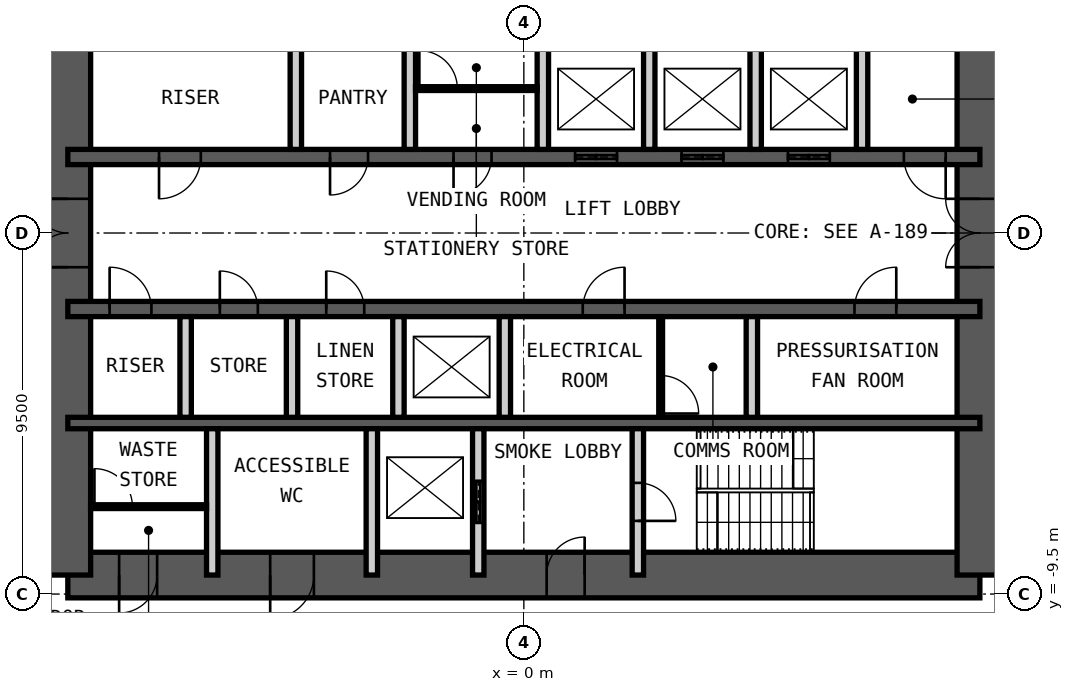
"""IFC4 building model, lengths in metres.
Left out: names, types, materials, properties, quantities, classifications, styles, units other than length and angle.
Written with IfcOpenShell. Run it as: python <this file> out.ifc"""

import sys

from ifc_helpers import new_model, si_unit, direction, frame, frame_2d, origin, place, context, subcontext, project, spatial, rectangle, extrude, element, fill, save


model = new_model("IFC4")
c1 = context("Model", 3, precision=1e-05, world=origin(), true_north=direction((0.0, 1.0)))
c2 = subcontext(c1, "Body", "Model", "MODEL_VIEW")
j1 = project(units=[si_unit("LENGTHUNIT", "METRE"), si_unit("PLANEANGLEUNIT", "RADIAN")], contexts=[c1])
p1 = place(None, origin())
s1 = spatial("IfcSite", under=j1, at=p1, CompositionType="ELEMENT")
p2 = place(p1, origin())
s2 = spatial("IfcBuilding", under=s1, at=p2, CompositionType="ELEMENT")
p3 = place(p2, frame((0.0, 0.0, 193.0)))
s3 = spatial("IfcBuildingStorey", under=s2, at=p3, CompositionType="ELEMENT", Elevation=193.0)
p4 = place(p3, frame((-12.0, -9.0, 0.0), z_axis=(0.0, 0.0, 1.0), x_axis=(1.0, 0.0, 0.0)))
e1 = element("IfcWall", 1, at=p4, inside=s3, PredefinedType="SHEAR", context=c2, shape_type="SweptSolid", body=[
    extrude(rectangle(XDim=24.0, YDim=1.2, at=frame_2d((12.0, 0.0))), origin(), (0.0, 0.0, 1.0), 4.2),
])
p5 = place(p4, frame((1.35, 0.0, 0.0)))
e2 = element("IfcOpeningElement", 2, at=p5, cuts=e1, PredefinedType="OPENING", context=c2, shape_type="SweptSolid", body=[
    extrude(rectangle(XDim=1.0, YDim=2.1, at=frame_2d((0.5, 1.05))), frame((0.0, 0.61, 0.0), z_axis=(0.0, -1.0, 0.0), x_axis=(1.0, 0.0, 0.0)), (0.0, 0.0, 1.0), 1.22),
])
p6 = place(p4, frame((5.325, 0.0, 0.0)))
e3 = element("IfcOpeningElement", 3, at=p6, cuts=e1, PredefinedType="OPENING", context=c2, shape_type="SweptSolid", body=[
    extrude(rectangle(XDim=1.15, YDim=2.1, at=frame_2d((0.575, 1.05))), frame((0.0, 0.61, 0.0), z_axis=(0.0, -1.0, 0.0), x_axis=(1.0, 0.0, 0.0)), (0.0, 0.0, 1.0), 1.22),
])
p7 = place(p4, frame((12.6, 0.0, 0.0)))
e4 = element("IfcOpeningElement", 4, at=p7, cuts=e1, PredefinedType="OPENING", context=c2, shape_type="SweptSolid", body=[
    extrude(rectangle(XDim=1.0, YDim=2.1, at=frame_2d((0.5, 1.05))), frame((0.0, 0.61, 0.0), z_axis=(0.0, -1.0, 0.0), x_axis=(1.0, 0.0, 0.0)), (0.0, 0.0, 1.0), 1.22),
])
p8 = place(p3, frame((12.0, -9.0, 0.0), z_axis=(0.0, 0.0, 1.0), x_axis=(0.0, 1.0, 0.0)))
e5 = element("IfcWall", 5, at=p8, inside=s3, PredefinedType="SHEAR", context=c2, shape_type="SweptSolid", body=[
    extrude(rectangle(XDim=18.0, YDim=1.2, at=frame_2d((9.0, 0.0))), origin(), (0.0, 0.0, 1.0), 4.2),
])
p9 = place(p8, frame((8.1, 0.0, 0.0)))
e6 = element("IfcOpeningElement", 6, at=p9, cuts=e5, PredefinedType="OPENING", context=c2, shape_type="SweptSolid", body=[
    extrude(rectangle(XDim=1.8, YDim=2.1, at=frame_2d((0.9, 1.05))), frame((0.0, 0.61, 0.0), z_axis=(0.0, -1.0, 0.0), x_axis=(1.0, 0.0, 0.0)), (0.0, 0.0, 1.0), 1.22),
])
p10 = place(p3, frame((-12.0, -9.0, 0.0), z_axis=(0.0, 0.0, 1.0), x_axis=(0.0, 1.0, 0.0)))
e7 = element("IfcWall", 7, at=p10, inside=s3, PredefinedType="SHEAR", context=c2, shape_type="SweptSolid", body=[
    extrude(rectangle(XDim=18.0, YDim=1.2, at=frame_2d((9.0, 0.0))), origin(), (0.0, 0.0, 1.0), 4.2),
])
p11 = place(p10, frame((8.1, 0.0, 0.0)))
e8 = element("IfcOpeningElement", 8, at=p11, cuts=e7, PredefinedType="OPENING", context=c2, shape_type="SweptSolid", body=[
    extrude(rectangle(XDim=1.8, YDim=2.1, at=frame_2d((0.9, 1.05))), frame((0.0, 0.61, 0.0), z_axis=(0.0, -1.0, 0.0), x_axis=(1.0, 0.0, 0.0)), (0.0, 0.0, 1.0), 1.22),
])
p12 = place(p3, frame((-12.0, 2.0, 0.0), z_axis=(0.0, 0.0, 1.0), x_axis=(1.0, 0.0, 0.0)))
e9 = element("IfcWall", 9, at=p12, inside=s3, PredefinedType="SHEAR", context=c2, shape_type="SweptSolid", body=[
    extrude(rectangle(XDim=24.0, YDim=0.4, at=frame_2d((12.0, 0.0))), origin(), (0.0, 0.0, 1.0), 4.2),
])
p13 = place(p12, frame((2.4, 0.0, 0.0)))
e10 = element("IfcOpeningElement", 10, at=p13, cuts=e9, PredefinedType="OPENING", context=c2, shape_type="SweptSolid", body=[
    extrude(rectangle(XDim=1.1, YDim=2.1, at=frame_2d((0.55, 1.05))), frame((0.0, 0.21, 0.0), z_axis=(0.0, -1.0, 0.0), x_axis=(1.0, 0.0, 0.0)), (0.0, 0.0, 1.0), 0.42),
])
p14 = place(p12, frame((22.0, 0.0, 0.0)))
e11 = element("IfcOpeningElement", 11, at=p14, cuts=e9, PredefinedType="OPENING", context=c2, shape_type="SweptSolid", body=[
    extrude(rectangle(XDim=1.1, YDim=2.1, at=frame_2d((0.55, 1.05))), frame((0.0, 0.21, 0.0), z_axis=(0.0, -1.0, 0.0), x_axis=(1.0, 0.0, 0.0)), (0.0, 0.0, 1.0), 0.42),
])
p15 = place(p12, frame((10.15, 0.0, 0.0)))
e12 = element("IfcOpeningElement", 12, at=p15, cuts=e9, PredefinedType="OPENING", context=c2, shape_type="SweptSolid", body=[
    extrude(rectangle(XDim=1.0, YDim=2.1, at=frame_2d((0.5, 1.05))), frame((0.0, 0.21, 0.0), z_axis=(0.0, -1.0, 0.0), x_axis=(1.0, 0.0, 0.0)), (0.0, 0.0, 1.0), 0.42),
])
p16 = place(p12, frame((6.9, 0.0, 0.0)))
e13 = element("IfcOpeningElement", 13, at=p16, cuts=e9, PredefinedType="OPENING", context=c2, shape_type="SweptSolid", body=[
    extrude(rectangle(XDim=1.0, YDim=2.1, at=frame_2d((0.5, 1.05))), frame((0.0, 0.21, 0.0), z_axis=(0.0, -1.0, 0.0), x_axis=(1.0, 0.0, 0.0)), (0.0, 0.0, 1.0), 0.42),
])
p17 = place(p12, frame((13.35, 0.0, 0.0)))
e14 = element("IfcOpeningElement", 14, at=p17, cuts=e9, PredefinedType="OPENING", context=c2, shape_type="SweptSolid", body=[
    extrude(rectangle(XDim=1.1, YDim=2.4, at=frame_2d((0.55, 1.2))), frame((0.0, 0.21, 0.0), z_axis=(0.0, -1.0, 0.0), x_axis=(1.0, 0.0, 0.0)), (0.0, 0.0, 1.0), 0.42),
])
p18 = place(p12, frame((16.15, 0.0, 0.0)))
e15 = element("IfcOpeningElement", 15, at=p18, cuts=e9, PredefinedType="OPENING", context=c2, shape_type="SweptSolid", body=[
    extrude(rectangle(XDim=1.1, YDim=2.4, at=frame_2d((0.55, 1.2))), frame((0.0, 0.21, 0.0), z_axis=(0.0, -1.0, 0.0), x_axis=(1.0, 0.0, 0.0)), (0.0, 0.0, 1.0), 0.42),
])
p19 = place(p12, frame((18.95, 0.0, 0.0)))
e16 = element("IfcOpeningElement", 16, at=p19, cuts=e9, PredefinedType="OPENING", context=c2, shape_type="SweptSolid", body=[
    extrude(rectangle(XDim=1.1, YDim=2.4, at=frame_2d((0.55, 1.2))), frame((0.0, 0.21, 0.0), z_axis=(0.0, -1.0, 0.0), x_axis=(1.0, 0.0, 0.0)), (0.0, 0.0, 1.0), 0.42),
])
p20 = place(p3, frame((-12.0, -2.0, 0.0), z_axis=(0.0, 0.0, 1.0), x_axis=(1.0, 0.0, 0.0)))
e17 = element("IfcWall", 17, at=p20, inside=s3, PredefinedType="SHEAR", context=c2, shape_type="SweptSolid", body=[
    extrude(rectangle(XDim=24.0, YDim=0.4, at=frame_2d((12.0, 0.0))), origin(), (0.0, 0.0, 1.0), 4.2),
])
p21 = place(p20, frame((1.1, 0.0, 0.0)))
e18 = element("IfcOpeningElement", 18, at=p21, cuts=e17, PredefinedType="OPENING", context=c2, shape_type="SweptSolid", body=[
    extrude(rectangle(XDim=1.1, YDim=2.1, at=frame_2d((0.55, 1.05))), frame((0.0, 0.21, 0.0), z_axis=(0.0, -1.0, 0.0), x_axis=(1.0, 0.0, 0.0)), (0.0, 0.0, 1.0), 0.42),
])
p22 = place(p20, frame((13.55, 0.0, 0.0)))
e19 = element("IfcOpeningElement", 19, at=p22, cuts=e17, PredefinedType="OPENING", context=c2, shape_type="SweptSolid", body=[
    extrude(rectangle(XDim=1.1, YDim=2.1, at=frame_2d((0.55, 1.05))), frame((0.0, 0.21, 0.0), z_axis=(0.0, -1.0, 0.0), x_axis=(1.0, 0.0, 0.0)), (0.0, 0.0, 1.0), 0.42),
])
p23 = place(p20, frame((20.7, 0.0, 0.0)))
e20 = element("IfcOpeningElement", 20, at=p23, cuts=e17, PredefinedType="OPENING", context=c2, shape_type="SweptSolid", body=[
    extrude(rectangle(XDim=1.1, YDim=2.1, at=frame_2d((0.55, 1.05))), frame((0.0, 0.21, 0.0), z_axis=(0.0, -1.0, 0.0), x_axis=(1.0, 0.0, 0.0)), (0.0, 0.0, 1.0), 0.42),
])
p24 = place(p20, frame((4.0, 0.0, 0.0)))
e21 = element("IfcOpeningElement", 21, at=p24, cuts=e17, PredefinedType="OPENING", context=c2, shape_type="SweptSolid", body=[
    extrude(rectangle(XDim=1.0, YDim=2.1, at=frame_2d((0.5, 1.05))), frame((0.0, 0.21, 0.0), z_axis=(0.0, -1.0, 0.0), x_axis=(1.0, 0.0, 0.0)), (0.0, 0.0, 1.0), 0.42),
])
p25 = place(p20, frame((6.8, 0.0, 0.0)))
e22 = element("IfcOpeningElement", 22, at=p25, cuts=e17, PredefinedType="OPENING", context=c2, shape_type="SweptSolid", body=[
    extrude(rectangle(XDim=1.0, YDim=2.1, at=frame_2d((0.5, 1.05))), frame((0.0, 0.21, 0.0), z_axis=(0.0, -1.0, 0.0), x_axis=(1.0, 0.0, 0.0)), (0.0, 0.0, 1.0), 0.42),
])
p26 = place(p3, frame((-12.0, -5.0, 0.0), z_axis=(0.0, 0.0, 1.0), x_axis=(1.0, 0.0, 0.0)))
e23 = element("IfcWall", 23, at=p26, inside=s3, PredefinedType="SHEAR", context=c2, shape_type="SweptSolid", body=[
    extrude(rectangle(XDim=24.0, YDim=0.3, at=frame_2d((12.0, 0.0))), origin(), (0.0, 0.0, 1.0), 4.2),
])
for number, where, z_axis, x_axis in (
    (24, (-6.0, 2.2, 0.0), (0.0, 0.0, 1.0), (0.0, 1.0, 0.0)),
    (25, (-3.0, 2.2, 0.0), (0.0, 0.0, 1.0), (0.0, 1.0, 0.0)),
    (26, (0.5, 2.2, 0.0), (0.0, 0.0, 1.0), (0.0, 1.0, 0.0)),
    (27, (3.3, 2.2, 0.0), (0.0, 0.0, 1.0), (0.0, 1.0, 0.0)),
    (28, (6.1, 2.2, 0.0), (0.0, 0.0, 1.0), (0.0, 1.0, 0.0)),
    (29, (8.9, 2.2, 0.0), (0.0, 0.0, 1.0), (0.0, 1.0, 0.0)),
    (30, (-8.9, -4.85, 0.0), (0.0, 0.0, 1.0), (0.0, 1.0, 0.0)),
    (31, (-6.1, -4.85, 0.0), (0.0, 0.0, 1.0), (0.0, 1.0, 0.0)),
    (32, (-3.3, -4.85, 0.0), (0.0, 0.0, 1.0), (0.0, 1.0, 0.0)),
    (33, (-0.5, -4.85, 0.0), (0.0, 0.0, 1.0), (0.0, 1.0, 0.0)),
    (34, (6.0, -4.85, 0.0), (0.0, 0.0, 1.0), (0.0, 1.0, 0.0)),
):
    element("IfcWall", number, at=place(p3, frame(where, z_axis=z_axis, x_axis=x_axis)), inside=s3, PredefinedType="PARTITIONING", context=c2, shape_type="SweptSolid", body=[
        extrude(rectangle(XDim=2.65, YDim=0.3, at=frame_2d((1.325, 0.0))), origin(), (0.0, 0.0, 1.0), 3.98),
    ])
for number, where, z_axis, x_axis in (
    (35, (-8.2, -9.0, 0.0), (0.0, 0.0, 1.0), (0.0, 1.0, 0.0)),
    (36, (-4.0, -9.0, 0.0), (0.0, 0.0, 1.0), (0.0, 1.0, 0.0)),
):
    element("IfcWall", number, at=place(p3, frame(where, z_axis=z_axis, x_axis=x_axis)), inside=s3, PredefinedType="PARTITIONING", context=c2, shape_type="SweptSolid", body=[
        extrude(rectangle(XDim=3.85, YDim=0.3, at=frame_2d((1.925, 0.0))), origin(), (0.0, 0.0, 1.0), 3.98),
    ])
p27 = place(p3, frame((-1.2, -9.0, 0.0), z_axis=(0.0, 0.0, 1.0), x_axis=(0.0, 1.0, 0.0)))
e37 = element("IfcWall", 37, at=p27, inside=s3, PredefinedType="PARTITIONING", context=c2, shape_type="SweptSolid", body=[
    extrude(rectangle(XDim=3.85, YDim=0.3, at=frame_2d((1.925, 0.0))), origin(), (0.0, 0.0, 1.0), 3.98),
])
p28 = place(p27, frame((1.375, 0.0, 0.0)))
e38 = element("IfcOpeningElement", 38, at=p28, cuts=e37, PredefinedType="OPENING", context=c2, shape_type="SweptSolid", body=[
    extrude(rectangle(XDim=1.1, YDim=2.4, at=frame_2d((0.55, 1.2))), frame((0.0, 0.16, 0.0), z_axis=(0.0, -1.0, 0.0), x_axis=(1.0, 0.0, 0.0)), (0.0, 0.0, 1.0), 0.32),
])
p29 = place(p3, frame((3.0, -9.0, 0.0), z_axis=(0.0, 0.0, 1.0), x_axis=(0.0, 1.0, 0.0)))
e39 = element("IfcWall", 39, at=p29, inside=s3, PredefinedType="PARTITIONING", context=c2, shape_type="SweptSolid", body=[
    extrude(rectangle(XDim=3.85, YDim=0.3, at=frame_2d((1.925, 0.0))), origin(), (0.0, 0.0, 1.0), 3.98),
])
p30 = place(p29, frame((1.425, 0.0, 0.0)))
e40 = element("IfcOpeningElement", 40, at=p30, cuts=e39, PredefinedType="OPENING", context=c2, shape_type="SweptSolid", body=[
    extrude(rectangle(XDim=1.0, YDim=2.1, at=frame_2d((0.5, 1.05))), frame((0.0, 0.16, 0.0), z_axis=(0.0, -1.0, 0.0), x_axis=(1.0, 0.0, 0.0)), (0.0, 0.0, 1.0), 0.32),
])
p31 = place(p3, frame((-2.85, 3.8, 0.0), z_axis=(0.0, 0.0, 1.0), x_axis=(1.0, 0.0, 0.0)))
e41 = element("IfcWall", 41, at=p31, inside=s3, PredefinedType="PARTITIONING", context=c2, shape_type="SweptSolid", body=[
    extrude(rectangle(XDim=3.2, YDim=0.1, at=frame_2d((1.6, 0.0))), origin(), (0.0, 0.0, 1.0), 3.98),
])
p32 = place(p31, frame((0.1, 0.0, 0.0)))
e42 = element("IfcOpeningElement", 42, at=p32, cuts=e41, PredefinedType="OPENING", context=c2, shape_type="SweptSolid", body=[
    extrude(rectangle(XDim=1.0, YDim=2.4, at=frame_2d((0.5, 1.2))), frame((0.0, 0.06, 0.0), z_axis=(0.0, -1.0, 0.0), x_axis=(1.0, 0.0, 0.0)), (0.0, 0.0, 1.0), 0.12),
])
p33 = place(p3, frame((3.6, -4.85, 0.0), z_axis=(0.0, 0.0, 1.0), x_axis=(0.0, 1.0, 0.0)))
e43 = element("IfcWall", 43, at=p33, inside=s3, PredefinedType="PARTITIONING", context=c2, shape_type="SweptSolid", body=[
    extrude(rectangle(XDim=2.65, YDim=0.1, at=frame_2d((1.325, 0.0))), origin(), (0.0, 0.0, 1.0), 3.98),
])
p34 = place(p33, frame((0.1, 0.0, 0.0)))
e44 = element("IfcOpeningElement", 44, at=p34, cuts=e43, PredefinedType="OPENING", context=c2, shape_type="SweptSolid", body=[
    extrude(rectangle(XDim=1.0, YDim=2.4, at=frame_2d((0.5, 1.2))), frame((0.0, 0.06, 0.0), z_axis=(0.0, -1.0, 0.0), x_axis=(1.0, 0.0, 0.0)), (0.0, 0.0, 1.0), 0.12),
])
p35 = place(p3, frame((-11.4, -7.2, 0.0), z_axis=(0.0, 0.0, 1.0), x_axis=(1.0, 0.0, 0.0)))
e45 = element("IfcWall", 45, at=p35, inside=s3, PredefinedType="PARTITIONING", context=c2, shape_type="SweptSolid", body=[
    extrude(rectangle(XDim=3.05, YDim=0.1, at=frame_2d((1.525, 0.0))), origin(), (0.0, 0.0, 1.0), 3.98),
])
p36 = place(p35, frame((0.1, 0.0, 0.0)))
e46 = element("IfcOpeningElement", 46, at=p36, cuts=e45, PredefinedType="OPENING", context=c2, shape_type="SweptSolid", body=[
    extrude(rectangle(XDim=1.0, YDim=2.4, at=frame_2d((0.5, 1.2))), frame((0.0, 0.06, 0.0), z_axis=(0.0, -1.0, 0.0), x_axis=(1.0, 0.0, 0.0)), (0.0, 0.0, 1.0), 0.12),
])
p37 = place(p5, origin())
e47 = element("IfcDoor", 47, at=p37, inside=s3, OperationType="SINGLE_SWING_LEFT", PredefinedType="DOOR", context=c2, shape_type="SweptSolid", body=[
    extrude(rectangle(XDim=1.0, YDim=2.1, at=frame_2d((0.5, 1.05))), frame((0.0, 0.025, 0.0), z_axis=(0.0, -1.0, 0.0), x_axis=(1.0, 0.0, 0.0)), (0.0, 0.0, 1.0), 0.05),
])
fill(e2, e47)
p38 = place(p6, origin())
e48 = element("IfcDoor", 48, at=p38, inside=s3, OperationType="SINGLE_SWING_LEFT", PredefinedType="DOOR", context=c2, shape_type="SweptSolid", body=[
    extrude(rectangle(XDim=1.15, YDim=2.1, at=frame_2d((0.575, 1.05))), frame((0.0, 0.025, 0.0), z_axis=(0.0, -1.0, 0.0), x_axis=(1.0, 0.0, 0.0)), (0.0, 0.0, 1.0), 0.05),
])
fill(e3, e48)
p39 = place(p7, origin())
e49 = element("IfcDoor", 49, at=p39, inside=s3, OperationType="SINGLE_SWING_LEFT", PredefinedType="DOOR", context=c2, shape_type="SweptSolid", body=[
    extrude(rectangle(XDim=1.0, YDim=2.1, at=frame_2d((0.5, 1.05))), frame((0.0, 0.025, 0.0), z_axis=(0.0, -1.0, 0.0), x_axis=(1.0, 0.0, 0.0)), (0.0, 0.0, 1.0), 0.05),
])
fill(e4, e49)
p40 = place(p30, origin())
e50 = element("IfcDoor", 50, at=p40, inside=s3, OperationType="SINGLE_SWING_LEFT", PredefinedType="DOOR", context=c2, shape_type="SweptSolid", body=[
    extrude(rectangle(XDim=1.0, YDim=2.1, at=frame_2d((0.5, 1.05))), frame((0.0, 0.025, 0.0), z_axis=(0.0, -1.0, 0.0), x_axis=(1.0, 0.0, 0.0)), (0.0, 0.0, 1.0), 0.05),
])
fill(e40, e50)
p41 = place(p13, origin())
e51 = element("IfcDoor", 51, at=p41, inside=s3, OperationType="SINGLE_SWING_LEFT", PredefinedType="DOOR", context=c2, shape_type="SweptSolid", body=[
    extrude(rectangle(XDim=1.1, YDim=2.1, at=frame_2d((0.55, 1.05))), frame((0.0, 0.025, 0.0), z_axis=(0.0, -1.0, 0.0), x_axis=(1.0, 0.0, 0.0)), (0.0, 0.0, 1.0), 0.05),
])
fill(e10, e51)
p42 = place(p21, origin())
e52 = element("IfcDoor", 52, at=p42, inside=s3, OperationType="SINGLE_SWING_RIGHT", PredefinedType="DOOR", context=c2, shape_type="SweptSolid", body=[
    extrude(rectangle(XDim=1.1, YDim=2.1, at=frame_2d((0.55, 1.05))), frame((0.0, 0.025, 0.0), z_axis=(0.0, -1.0, 0.0), x_axis=(1.0, 0.0, 0.0)), (0.0, 0.0, 1.0), 0.05),
])
fill(e18, e52)
p43 = place(p14, origin())
e53 = element("IfcDoor", 53, at=p43, inside=s3, OperationType="SINGLE_SWING_RIGHT", PredefinedType="DOOR", context=c2, shape_type="SweptSolid", body=[
    extrude(rectangle(XDim=1.1, YDim=2.1, at=frame_2d((0.55, 1.05))), frame((0.0, 0.025, 0.0), z_axis=(0.0, -1.0, 0.0), x_axis=(1.0, 0.0, 0.0)), (0.0, 0.0, 1.0), 0.05),
])
fill(e11, e53)
p44 = place(p15, origin())
e54 = element("IfcDoor", 54, at=p44, inside=s3, OperationType="SINGLE_SWING_LEFT", PredefinedType="DOOR", context=c2, shape_type="SweptSolid", body=[
    extrude(rectangle(XDim=1.0, YDim=2.1, at=frame_2d((0.5, 1.05))), frame((0.0, 0.025, 0.0), z_axis=(0.0, -1.0, 0.0), x_axis=(1.0, 0.0, 0.0)), (0.0, 0.0, 1.0), 0.05),
])
fill(e12, e54)
p45 = place(p22, origin())
e55 = element("IfcDoor", 55, at=p45, inside=s3, OperationType="SINGLE_SWING_LEFT", PredefinedType="DOOR", context=c2, shape_type="SweptSolid", body=[
    extrude(rectangle(XDim=1.1, YDim=2.1, at=frame_2d((0.55, 1.05))), frame((0.0, 0.025, 0.0), z_axis=(0.0, -1.0, 0.0), x_axis=(1.0, 0.0, 0.0)), (0.0, 0.0, 1.0), 0.05),
])
fill(e19, e55)
p46 = place(p23, origin())
e56 = element("IfcDoor", 56, at=p46, inside=s3, OperationType="SINGLE_SWING_LEFT", PredefinedType="DOOR", context=c2, shape_type="SweptSolid", body=[
    extrude(rectangle(XDim=1.1, YDim=2.1, at=frame_2d((0.55, 1.05))), frame((0.0, 0.025, 0.0), z_axis=(0.0, -1.0, 0.0), x_axis=(1.0, 0.0, 0.0)), (0.0, 0.0, 1.0), 0.05),
])
fill(e20, e56)
p47 = place(p9, origin())
e57 = element("IfcDoor", 57, at=p47, inside=s3, OperationType="DOUBLE_DOOR_DOUBLE_SWING", PredefinedType="DOOR", context=c2, shape_type="SweptSolid", body=[
    extrude(rectangle(XDim=1.8, YDim=2.1, at=frame_2d((0.9, 1.05))), frame((0.0, 0.025, 0.0), z_axis=(0.0, -1.0, 0.0), x_axis=(1.0, 0.0, 0.0)), (0.0, 0.0, 1.0), 0.05),
])
fill(e6, e57)
p48 = place(p11, origin())
e58 = element("IfcDoor", 58, at=p48, inside=s3, OperationType="DOUBLE_DOOR_DOUBLE_SWING", PredefinedType="DOOR", context=c2, shape_type="SweptSolid", body=[
    extrude(rectangle(XDim=1.8, YDim=2.1, at=frame_2d((0.9, 1.05))), frame((0.0, 0.025, 0.0), z_axis=(0.0, -1.0, 0.0), x_axis=(1.0, 0.0, 0.0)), (0.0, 0.0, 1.0), 0.05),
])
fill(e8, e58)
p49 = place(p28, origin())
e59 = element("IfcDoor", 59, at=p49, inside=s3, OperationType="DOUBLE_DOOR_SLIDING", PredefinedType="DOOR", context=c2, shape_type="SweptSolid", body=[
    extrude(rectangle(XDim=1.1, YDim=2.4, at=frame_2d((0.55, 1.2))), frame((0.0, 0.025, 0.0), z_axis=(0.0, -1.0, 0.0), x_axis=(1.0, 0.0, 0.0)), (0.0, 0.0, 1.0), 0.05),
])
fill(e38, e59)
p50 = place(p16, origin())
e60 = element("IfcDoor", 60, at=p50, inside=s3, OperationType="SINGLE_SWING_LEFT", PredefinedType="DOOR", context=c2, shape_type="SweptSolid", body=[
    extrude(rectangle(XDim=1.0, YDim=2.1, at=frame_2d((0.5, 1.05))), frame((0.0, 0.025, 0.0), z_axis=(0.0, -1.0, 0.0), x_axis=(1.0, 0.0, 0.0)), (0.0, 0.0, 1.0), 0.05),
])
fill(e13, e60)
p51 = place(p17, origin())
e61 = element("IfcDoor", 61, at=p51, inside=s3, OperationType="DOUBLE_DOOR_SLIDING", PredefinedType="DOOR", context=c2, shape_type="SweptSolid", body=[
    extrude(rectangle(XDim=1.1, YDim=2.4, at=frame_2d((0.55, 1.2))), frame((0.0, 0.025, 0.0), z_axis=(0.0, -1.0, 0.0), x_axis=(1.0, 0.0, 0.0)), (0.0, 0.0, 1.0), 0.05),
])
fill(e14, e61)
p52 = place(p18, origin())
e62 = element("IfcDoor", 62, at=p52, inside=s3, OperationType="DOUBLE_DOOR_SLIDING", PredefinedType="DOOR", context=c2, shape_type="SweptSolid", body=[
    extrude(rectangle(XDim=1.1, YDim=2.4, at=frame_2d((0.55, 1.2))), frame((0.0, 0.025, 0.0), z_axis=(0.0, -1.0, 0.0), x_axis=(1.0, 0.0, 0.0)), (0.0, 0.0, 1.0), 0.05),
])
fill(e15, e62)
p53 = place(p19, origin())
e63 = element("IfcDoor", 63, at=p53, inside=s3, OperationType="DOUBLE_DOOR_SLIDING", PredefinedType="DOOR", context=c2, shape_type="SweptSolid", body=[
    extrude(rectangle(XDim=1.1, YDim=2.4, at=frame_2d((0.55, 1.2))), frame((0.0, 0.025, 0.0), z_axis=(0.0, -1.0, 0.0), x_axis=(1.0, 0.0, 0.0)), (0.0, 0.0, 1.0), 0.05),
])
fill(e16, e63)
p54 = place(p24, origin())
e64 = element("IfcDoor", 64, at=p54, inside=s3, OperationType="SINGLE_SWING_RIGHT", PredefinedType="DOOR", context=c2, shape_type="SweptSolid", body=[
    extrude(rectangle(XDim=1.0, YDim=2.1, at=frame_2d((0.5, 1.05))), frame((0.0, 0.025, 0.0), z_axis=(0.0, -1.0, 0.0), x_axis=(1.0, 0.0, 0.0)), (0.0, 0.0, 1.0), 0.05),
])
fill(e21, e64)
p55 = place(p25, origin())
e65 = element("IfcDoor", 65, at=p55, inside=s3, OperationType="SINGLE_SWING_RIGHT", PredefinedType="DOOR", context=c2, shape_type="SweptSolid", body=[
    extrude(rectangle(XDim=1.0, YDim=2.1, at=frame_2d((0.5, 1.05))), frame((0.0, 0.025, 0.0), z_axis=(0.0, -1.0, 0.0), x_axis=(1.0, 0.0, 0.0)), (0.0, 0.0, 1.0), 0.05),
])
fill(e22, e65)
p56 = place(p32, origin())
e66 = element("IfcDoor", 66, at=p56, inside=s3, OperationType="SINGLE_SWING_RIGHT", PredefinedType="DOOR", context=c2, shape_type="SweptSolid", body=[
    extrude(rectangle(XDim=1.0, YDim=2.4, at=frame_2d((0.5, 1.2))), frame((0.0, 0.025, 0.0), z_axis=(0.0, -1.0, 0.0), x_axis=(1.0, 0.0, 0.0)), (0.0, 0.0, 1.0), 0.05),
])
fill(e42, e66)
p57 = place(p34, origin())
e67 = element("IfcDoor", 67, at=p57, inside=s3, OperationType="SINGLE_SWING_LEFT", PredefinedType="DOOR", context=c2, shape_type="SweptSolid", body=[
    extrude(rectangle(XDim=1.0, YDim=2.4, at=frame_2d((0.5, 1.2))), frame((0.0, 0.025, 0.0), z_axis=(0.0, -1.0, 0.0), x_axis=(1.0, 0.0, 0.0)), (0.0, 0.0, 1.0), 0.05),
])
fill(e44, e67)
p58 = place(p36, origin())
e68 = element("IfcDoor", 68, at=p58, inside=s3, OperationType="SINGLE_SWING_RIGHT", PredefinedType="DOOR", context=c2, shape_type="SweptSolid", body=[
    extrude(rectangle(XDim=1.0, YDim=2.4, at=frame_2d((0.5, 1.2))), frame((0.0, 0.025, 0.0), z_axis=(0.0, -1.0, 0.0), x_axis=(1.0, 0.0, 0.0)), (0.0, 0.0, 1.0), 0.05),
])
fill(e46, e68)
save(model, sys.argv[1])
